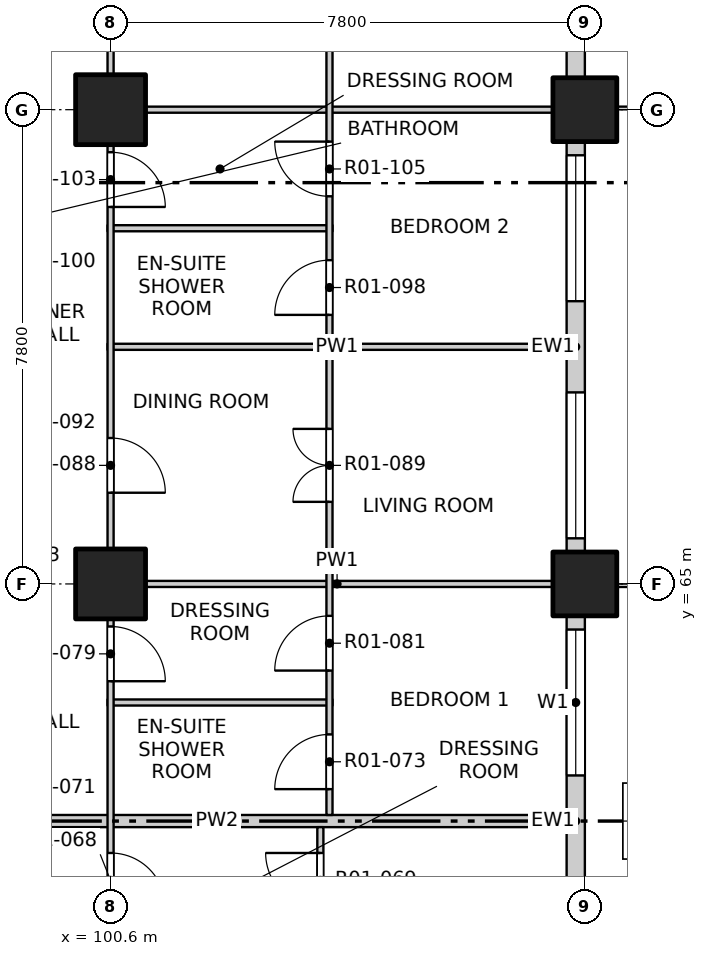
"""IFC4 building model, lengths in metres.
Left out: names, types, materials, properties, quantities, classifications, styles, units other than length and angle.
Written with IfcOpenShell. Run it as: python <this file> out.ifc"""

import sys

from ifc_helpers import new_model, si_unit, direction, frame, frame_2d, origin, origin_2d, place, context, subcontext, project, spatial, rectangle, extrude, element, fill, save


model = new_model("IFC4")
c1 = context("Model", 3, precision=1e-05, world=origin(), true_north=direction((0.0, 1.0)))
c2 = subcontext(c1, "Body", "Model", "MODEL_VIEW")
j1 = project(units=[si_unit("LENGTHUNIT", "METRE"), si_unit("PLANEANGLEUNIT", "RADIAN")], contexts=[c1])
p1 = place(None, origin())
s1 = spatial("IfcSite", under=j1, at=p1, CompositionType="ELEMENT")
p2 = place(p1, origin())
s2 = spatial("IfcBuilding", under=s1, at=p2, CompositionType="ELEMENT")
p3 = place(p2, frame((0.0, 0.0, 19.5)))
s3 = spatial("IfcBuildingStorey", under=s2, at=p3, CompositionType="ELEMENT", Elevation=19.5)
for number, where, z_axis, x_axis in (
    (1, (108.4, 65.0, -0.25), (0.0, 0.0, 1.0), (1.0, 0.0, 0.0)),
    (2, (108.4, 72.8, -0.25), (0.0, 0.0, 1.0), (1.0, 0.0, 0.0)),
):
    element("IfcColumn", number, at=place(p3, frame(where, z_axis=z_axis, x_axis=x_axis)), inside=s3, PredefinedType="COLUMN", context=c2, shape_type="SweptSolid", body=[
        extrude(rectangle(XDim=1.05, YDim=1.05, at=origin_2d()), origin(), (0.0, 0.0, 1.0), 3.4),
    ])
for number, where, z_axis, x_axis in (
    (3, (100.6, 65.0, -0.25), (0.0, 0.0, 1.0), (1.0, 0.0, 0.0)),
    (4, (100.6, 72.8, -0.25), (0.0, 0.0, 1.0), (1.0, 0.0, 0.0)),
):
    element("IfcColumn", number, at=place(p3, frame(where, z_axis=z_axis, x_axis=x_axis)), inside=s3, PredefinedType="COLUMN", context=c2, shape_type="SweptSolid", body=[
        extrude(rectangle(XDim=1.15, YDim=1.15, at=origin_2d()), origin(), (0.0, 0.0, 1.0), 3.4),
    ])
p4 = place(p3, frame((108.25, 57.725, 0.0), z_axis=(0.0, 0.0, 1.0), x_axis=(0.0, 1.0, 0.0)))
e5 = element("IfcWall", 5, at=p4, inside=s3, PredefinedType="SOLIDWALL", context=c2, shape_type="SweptSolid", body=[
    extrude(rectangle(XDim=6.75, YDim=0.3, at=frame_2d((3.375, 0.0))), origin(), (0.0, 0.0, 1.0), 2.7),
])
p5 = place(p4, frame((0.525, 0.0, 0.0)))
e6 = element("IfcOpeningElement", 6, at=p5, cuts=e5, PredefinedType="OPENING", context=c2, shape_type="SweptSolid", body=[
    extrude(rectangle(XDim=1.8, YDim=2.4, at=frame_2d((0.9, 1.2))), frame((0.0, 0.16, 0.0), z_axis=(0.0, -1.0, 0.0), x_axis=(1.0, 0.0, 0.0)), (0.0, 0.0, 1.0), 0.32),
])
p6 = place(p4, frame((4.125, 0.0, 0.9)))
e7 = element("IfcOpeningElement", 7, at=p6, cuts=e5, PredefinedType="OPENING", context=c2, shape_type="SweptSolid", body=[
    extrude(rectangle(XDim=2.4, YDim=1.8, at=frame_2d((1.2, 0.9))), frame((0.0, 0.16, 0.0), z_axis=(0.0, -1.0, 0.0), x_axis=(1.0, 0.0, 0.0)), (0.0, 0.0, 1.0), 0.32),
])
p7 = place(p3, frame((108.25, 65.525, 0.0), z_axis=(0.0, 0.0, 1.0), x_axis=(0.0, 1.0, 0.0)))
e8 = element("IfcWall", 8, at=p7, inside=s3, PredefinedType="SOLIDWALL", context=c2, shape_type="SweptSolid", body=[
    extrude(rectangle(XDim=6.75, YDim=0.3, at=frame_2d((3.375, 0.0))), origin(), (0.0, 0.0, 1.0), 2.7),
])
p8 = place(p7, frame((0.225, 0.0, 0.9)))
e9 = element("IfcOpeningElement", 9, at=p8, cuts=e8, PredefinedType="OPENING", context=c2, shape_type="SweptSolid", body=[
    extrude(rectangle(XDim=2.4, YDim=1.8, at=frame_2d((1.2, 0.9))), frame((0.0, 0.16, 0.0), z_axis=(0.0, -1.0, 0.0), x_axis=(1.0, 0.0, 0.0)), (0.0, 0.0, 1.0), 0.32),
])
p9 = place(p7, frame((4.125, 0.0, 0.9)))
e10 = element("IfcOpeningElement", 10, at=p9, cuts=e8, PredefinedType="OPENING", context=c2, shape_type="SweptSolid", body=[
    extrude(rectangle(XDim=2.4, YDim=1.8, at=frame_2d((1.2, 0.9))), frame((0.0, 0.16, 0.0), z_axis=(0.0, -1.0, 0.0), x_axis=(1.0, 0.0, 0.0)), (0.0, 0.0, 1.0), 0.32),
])
p10 = place(p3, frame((108.25, 73.325, 0.0), z_axis=(0.0, 0.0, 1.0), x_axis=(0.0, 1.0, 0.0)))
e11 = element("IfcWall", 11, at=p10, inside=s3, PredefinedType="SOLIDWALL", context=c2, shape_type="SweptSolid", body=[
    extrude(rectangle(XDim=6.75, YDim=0.3, at=frame_2d((3.375, 0.0))), origin(), (0.0, 0.0, 1.0), 2.7),
])
p11 = place(p10, frame((0.525, 0.0, 0.0)))
e12 = element("IfcOpeningElement", 12, at=p11, cuts=e11, PredefinedType="OPENING", context=c2, shape_type="SweptSolid", body=[
    extrude(rectangle(XDim=1.8, YDim=2.4, at=frame_2d((0.9, 1.2))), frame((0.0, 0.16, 0.0), z_axis=(0.0, -1.0, 0.0), x_axis=(1.0, 0.0, 0.0)), (0.0, 0.0, 1.0), 0.32),
])
p12 = place(p10, frame((4.125, 0.0, 0.9)))
e13 = element("IfcOpeningElement", 13, at=p12, cuts=e11, PredefinedType="OPENING", context=c2, shape_type="SweptSolid", body=[
    extrude(rectangle(XDim=2.4, YDim=1.8, at=frame_2d((1.2, 0.9))), frame((0.0, 0.16, 0.0), z_axis=(0.0, -1.0, 0.0), x_axis=(1.0, 0.0, 0.0)), (0.0, 0.0, 1.0), 0.32),
])
p13 = place(p3, frame((96.6, 61.1, 0.0), z_axis=(0.0, 0.0, 1.0), x_axis=(1.0, 0.0, 0.0)))
e14 = element("IfcWall", 14, at=p13, inside=s3, PredefinedType="PARTITIONING", context=c2, shape_type="SweptSolid", body=[
    extrude(rectangle(XDim=11.5, YDim=0.2, at=frame_2d((5.75, 0.0))), origin(), (0.0, 0.0, 1.0), 3.15),
])
p14 = place(p3, frame((100.55, 63.05, 0.0), z_axis=(0.0, 0.0, 1.0), x_axis=(1.0, 0.0, 0.0)))
e15 = element("IfcWall", 15, at=p14, inside=s3, PredefinedType="PARTITIONING", context=c2, shape_type="SweptSolid", body=[
    extrude(rectangle(XDim=3.7, YDim=0.1, at=frame_2d((1.85, 0.0))), origin(), (0.0, 0.0, 1.0), 3.15),
])
p15 = place(p3, frame((100.55, 65.0, 0.0), z_axis=(0.0, 0.0, 1.0), x_axis=(1.0, 0.0, 0.0)))
e16 = element("IfcWall", 16, at=p15, inside=s3, PredefinedType="PARTITIONING", context=c2, shape_type="SweptSolid", body=[
    extrude(rectangle(XDim=7.55, YDim=0.1, at=frame_2d((3.775, 0.0))), origin(), (0.0, 0.0, 1.0), 2.55),
])
p16 = place(p3, frame((100.55, 68.9, 0.0), z_axis=(0.0, 0.0, 1.0), x_axis=(1.0, 0.0, 0.0)))
e17 = element("IfcWall", 17, at=p16, inside=s3, PredefinedType="PARTITIONING", context=c2, shape_type="SweptSolid", body=[
    extrude(rectangle(XDim=7.55, YDim=0.1, at=frame_2d((3.775, 0.0))), origin(), (0.0, 0.0, 1.0), 3.15),
])
p17 = place(p3, frame((100.55, 70.85, 0.0), z_axis=(0.0, 0.0, 1.0), x_axis=(1.0, 0.0, 0.0)))
e18 = element("IfcWall", 18, at=p17, inside=s3, PredefinedType="PARTITIONING", context=c2, shape_type="SweptSolid", body=[
    extrude(rectangle(XDim=3.7, YDim=0.1, at=frame_2d((1.85, 0.0))), origin(), (0.0, 0.0, 1.0), 3.15),
])
p18 = place(p3, frame((100.55, 72.8, 0.0), z_axis=(0.0, 0.0, 1.0), x_axis=(1.0, 0.0, 0.0)))
e19 = element("IfcWall", 19, at=p18, inside=s3, PredefinedType="PARTITIONING", context=c2, shape_type="SweptSolid", body=[
    extrude(rectangle(XDim=7.55, YDim=0.1, at=frame_2d((3.775, 0.0))), origin(), (0.0, 0.0, 1.0), 2.55),
])
p19 = place(p3, frame((100.6, 49.4, 0.0), z_axis=(0.0, 0.0, 1.0), x_axis=(0.0, 1.0, 0.0)))
e20 = element("IfcWall", 20, at=p19, inside=s3, PredefinedType="PARTITIONING", context=c2, shape_type="SweptSolid", body=[
    extrude(rectangle(XDim=31.2, YDim=0.1, at=frame_2d((15.6, 0.0))), origin(), (0.0, 0.0, 1.0), 3.15),
])
p20 = place(p19, frame((1.5, 0.0, 0.0)))
e21 = element("IfcOpeningElement", 21, at=p20, cuts=e20, PredefinedType="OPENING", context=c2, shape_type="SweptSolid", body=[
    extrude(rectangle(XDim=0.9, YDim=2.1, at=frame_2d((0.45, 1.05))), frame((0.0, 0.06, 0.0), z_axis=(0.0, -1.0, 0.0), x_axis=(1.0, 0.0, 0.0)), (0.0, 0.0, 1.0), 0.12),
])
p21 = place(p19, frame((5.4, 0.0, 0.0)))
e22 = element("IfcOpeningElement", 22, at=p21, cuts=e20, PredefinedType="OPENING", context=c2, shape_type="SweptSolid", body=[
    extrude(rectangle(XDim=0.9, YDim=2.1, at=frame_2d((0.45, 1.05))), frame((0.0, 0.06, 0.0), z_axis=(0.0, -1.0, 0.0), x_axis=(1.0, 0.0, 0.0)), (0.0, 0.0, 1.0), 0.12),
])
p22 = place(p19, frame((10.275, 0.0, 0.0)))
e23 = element("IfcOpeningElement", 23, at=p22, cuts=e20, PredefinedType="OPENING", context=c2, shape_type="SweptSolid", body=[
    extrude(rectangle(XDim=0.9, YDim=2.1, at=frame_2d((0.45, 1.05))), frame((0.0, 0.06, 0.0), z_axis=(0.0, -1.0, 0.0), x_axis=(1.0, 0.0, 0.0)), (0.0, 0.0, 1.0), 0.12),
])
p23 = place(p19, frame((14.0, 0.0, 0.0)))
e24 = element("IfcOpeningElement", 24, at=p23, cuts=e20, PredefinedType="OPENING", context=c2, shape_type="SweptSolid", body=[
    extrude(rectangle(XDim=0.9, YDim=2.1, at=frame_2d((0.45, 1.05))), frame((0.0, 0.06, 0.0), z_axis=(0.0, -1.0, 0.0), x_axis=(1.0, 0.0, 0.0)), (0.0, 0.0, 1.0), 0.12),
])
p24 = place(p19, frame((17.1, 0.0, 0.0)))
e25 = element("IfcOpeningElement", 25, at=p24, cuts=e20, PredefinedType="OPENING", context=c2, shape_type="SweptSolid", body=[
    extrude(rectangle(XDim=0.9, YDim=2.1, at=frame_2d((0.45, 1.05))), frame((0.0, 0.06, 0.0), z_axis=(0.0, -1.0, 0.0), x_axis=(1.0, 0.0, 0.0)), (0.0, 0.0, 1.0), 0.12),
])
p25 = place(p19, frame((21.8, 0.0, 0.0)))
e26 = element("IfcOpeningElement", 26, at=p25, cuts=e20, PredefinedType="OPENING", context=c2, shape_type="SweptSolid", body=[
    extrude(rectangle(XDim=0.9, YDim=2.1, at=frame_2d((0.45, 1.05))), frame((0.0, 0.06, 0.0), z_axis=(0.0, -1.0, 0.0), x_axis=(1.0, 0.0, 0.0)), (0.0, 0.0, 1.0), 0.12),
])
p26 = place(p19, frame((24.9, 0.0, 0.0)))
e27 = element("IfcOpeningElement", 27, at=p26, cuts=e20, PredefinedType="OPENING", context=c2, shape_type="SweptSolid", body=[
    extrude(rectangle(XDim=0.9, YDim=2.1, at=frame_2d((0.45, 1.05))), frame((0.0, 0.06, 0.0), z_axis=(0.0, -1.0, 0.0), x_axis=(1.0, 0.0, 0.0)), (0.0, 0.0, 1.0), 0.12),
])
p27 = place(p19, frame((28.8, 0.0, 0.0)))
e28 = element("IfcOpeningElement", 28, at=p27, cuts=e20, PredefinedType="OPENING", context=c2, shape_type="SweptSolid", body=[
    extrude(rectangle(XDim=0.9, YDim=2.1, at=frame_2d((0.45, 1.05))), frame((0.0, 0.06, 0.0), z_axis=(0.0, -1.0, 0.0), x_axis=(1.0, 0.0, 0.0)), (0.0, 0.0, 1.0), 0.12),
])
p28 = place(p3, frame((104.05, 41.9, 0.0), z_axis=(0.0, 0.0, 1.0), x_axis=(0.0, 1.0, 0.0)))
e29 = element("IfcWall", 29, at=p28, inside=s3, PredefinedType="PARTITIONING", context=c2, shape_type="SweptSolid", body=[
    extrude(rectangle(XDim=19.1, YDim=0.1, at=frame_2d((9.55, 0.0))), origin(), (0.0, 0.0, 1.0), 3.15),
])
p29 = place(p28, frame((1.05, 0.0, 0.0)))
e30 = element("IfcOpeningElement", 30, at=p29, cuts=e29, PredefinedType="OPENING", context=c2, shape_type="SweptSolid", body=[
    extrude(rectangle(XDim=1.2, YDim=2.1, at=frame_2d((0.6, 1.05))), frame((0.0, 0.06, 0.0), z_axis=(0.0, -1.0, 0.0), x_axis=(1.0, 0.0, 0.0)), (0.0, 0.0, 1.0), 0.12),
])
p30 = place(p28, frame((4.125, 0.0, 0.0)))
e31 = element("IfcOpeningElement", 31, at=p30, cuts=e29, PredefinedType="OPENING", context=c2, shape_type="SweptSolid", body=[
    extrude(rectangle(XDim=0.9, YDim=2.1, at=frame_2d((0.45, 1.05))), frame((0.0, 0.06, 0.0), z_axis=(0.0, -1.0, 0.0), x_axis=(1.0, 0.0, 0.0)), (0.0, 0.0, 1.0), 0.12),
])
p31 = place(p28, frame((6.075, 0.0, 0.0)))
e32 = element("IfcOpeningElement", 32, at=p31, cuts=e29, PredefinedType="OPENING", context=c2, shape_type="SweptSolid", body=[
    extrude(rectangle(XDim=0.9, YDim=2.1, at=frame_2d((0.45, 1.05))), frame((0.0, 0.06, 0.0), z_axis=(0.0, -1.0, 0.0), x_axis=(1.0, 0.0, 0.0)), (0.0, 0.0, 1.0), 0.12),
])
p32 = place(p28, frame((8.85, 0.0, 0.0)))
e33 = element("IfcOpeningElement", 33, at=p32, cuts=e29, PredefinedType="OPENING", context=c2, shape_type="SweptSolid", body=[
    extrude(rectangle(XDim=1.2, YDim=2.1, at=frame_2d((0.6, 1.05))), frame((0.0, 0.06, 0.0), z_axis=(0.0, -1.0, 0.0), x_axis=(1.0, 0.0, 0.0)), (0.0, 0.0, 1.0), 0.12),
])
p33 = place(p28, frame((12.75, 0.0, 0.0)))
e34 = element("IfcOpeningElement", 34, at=p33, cuts=e29, PredefinedType="OPENING", context=c2, shape_type="SweptSolid", body=[
    extrude(rectangle(XDim=1.2, YDim=2.1, at=frame_2d((0.6, 1.05))), frame((0.0, 0.06, 0.0), z_axis=(0.0, -1.0, 0.0), x_axis=(1.0, 0.0, 0.0)), (0.0, 0.0, 1.0), 0.12),
])
p34 = place(p28, frame((15.825, 0.0, 0.0)))
e35 = element("IfcOpeningElement", 35, at=p34, cuts=e29, PredefinedType="OPENING", context=c2, shape_type="SweptSolid", body=[
    extrude(rectangle(XDim=0.9, YDim=2.1, at=frame_2d((0.45, 1.05))), frame((0.0, 0.06, 0.0), z_axis=(0.0, -1.0, 0.0), x_axis=(1.0, 0.0, 0.0)), (0.0, 0.0, 1.0), 0.12),
])
p35 = place(p28, frame((17.775, 0.0, 0.0)))
e36 = element("IfcOpeningElement", 36, at=p35, cuts=e29, PredefinedType="OPENING", context=c2, shape_type="SweptSolid", body=[
    extrude(rectangle(XDim=0.9, YDim=2.1, at=frame_2d((0.45, 1.05))), frame((0.0, 0.06, 0.0), z_axis=(0.0, -1.0, 0.0), x_axis=(1.0, 0.0, 0.0)), (0.0, 0.0, 1.0), 0.12),
])
p36 = place(p3, frame((104.2, 61.2, 0.0), z_axis=(0.0, 0.0, 1.0), x_axis=(0.0, 1.0, 0.0)))
e37 = element("IfcWall", 37, at=p36, inside=s3, PredefinedType="PARTITIONING", context=c2, shape_type="SweptSolid", body=[
    extrude(rectangle(XDim=15.4, YDim=0.1, at=frame_2d((7.7, 0.0))), origin(), (0.0, 0.0, 1.0), 3.15),
])
p37 = place(p36, frame((0.425, 0.0, 0.0)))
e38 = element("IfcOpeningElement", 38, at=p37, cuts=e37, PredefinedType="OPENING", context=c2, shape_type="SweptSolid", body=[
    extrude(rectangle(XDim=0.9, YDim=2.1, at=frame_2d((0.45, 1.05))), frame((0.0, 0.06, 0.0), z_axis=(0.0, -1.0, 0.0), x_axis=(1.0, 0.0, 0.0)), (0.0, 0.0, 1.0), 0.12),
])
p38 = place(p36, frame((2.375, 0.0, 0.0)))
e39 = element("IfcOpeningElement", 39, at=p38, cuts=e37, PredefinedType="OPENING", context=c2, shape_type="SweptSolid", body=[
    extrude(rectangle(XDim=0.9, YDim=2.1, at=frame_2d((0.45, 1.05))), frame((0.0, 0.06, 0.0), z_axis=(0.0, -1.0, 0.0), x_axis=(1.0, 0.0, 0.0)), (0.0, 0.0, 1.0), 0.12),
])
p39 = place(p36, frame((5.15, 0.0, 0.0)))
e40 = element("IfcOpeningElement", 40, at=p39, cuts=e37, PredefinedType="OPENING", context=c2, shape_type="SweptSolid", body=[
    extrude(rectangle(XDim=1.2, YDim=2.1, at=frame_2d((0.6, 1.05))), frame((0.0, 0.06, 0.0), z_axis=(0.0, -1.0, 0.0), x_axis=(1.0, 0.0, 0.0)), (0.0, 0.0, 1.0), 0.12),
])
p40 = place(p36, frame((8.225, 0.0, 0.0)))
e41 = element("IfcOpeningElement", 41, at=p40, cuts=e37, PredefinedType="OPENING", context=c2, shape_type="SweptSolid", body=[
    extrude(rectangle(XDim=0.9, YDim=2.1, at=frame_2d((0.45, 1.05))), frame((0.0, 0.06, 0.0), z_axis=(0.0, -1.0, 0.0), x_axis=(1.0, 0.0, 0.0)), (0.0, 0.0, 1.0), 0.12),
])
p41 = place(p36, frame((10.175, 0.0, 0.0)))
e42 = element("IfcOpeningElement", 42, at=p41, cuts=e37, PredefinedType="OPENING", context=c2, shape_type="SweptSolid", body=[
    extrude(rectangle(XDim=0.9, YDim=2.1, at=frame_2d((0.45, 1.05))), frame((0.0, 0.06, 0.0), z_axis=(0.0, -1.0, 0.0), x_axis=(1.0, 0.0, 0.0)), (0.0, 0.0, 1.0), 0.12),
])
p42 = place(p36, frame((12.95, 0.0, 0.0)))
e43 = element("IfcOpeningElement", 43, at=p42, cuts=e37, PredefinedType="OPENING", context=c2, shape_type="SweptSolid", body=[
    extrude(rectangle(XDim=1.2, YDim=2.1, at=frame_2d((0.6, 1.05))), frame((0.0, 0.06, 0.0), z_axis=(0.0, -1.0, 0.0), x_axis=(1.0, 0.0, 0.0)), (0.0, 0.0, 1.0), 0.12),
])
p43 = place(p6, origin())
e44 = element("IfcWindow", 44, at=p43, inside=s3, PartitioningType="DOUBLE_PANEL_VERTICAL", PredefinedType="WINDOW", context=c2, shape_type="SweptSolid", body=[
    extrude(rectangle(XDim=2.4, YDim=1.8, at=frame_2d((1.2, 0.9))), frame((0.0, 0.03, 0.0), z_axis=(0.0, -1.0, 0.0), x_axis=(1.0, 0.0, 0.0)), (0.0, 0.0, 1.0), 0.06),
])
fill(e7, e44)
p44 = place(p8, origin())
e45 = element("IfcWindow", 45, at=p44, inside=s3, PartitioningType="DOUBLE_PANEL_VERTICAL", PredefinedType="WINDOW", context=c2, shape_type="SweptSolid", body=[
    extrude(rectangle(XDim=2.4, YDim=1.8, at=frame_2d((1.2, 0.9))), frame((0.0, 0.03, 0.0), z_axis=(0.0, -1.0, 0.0), x_axis=(1.0, 0.0, 0.0)), (0.0, 0.0, 1.0), 0.06),
])
fill(e9, e45)
p45 = place(p9, origin())
e46 = element("IfcWindow", 46, at=p45, inside=s3, PartitioningType="DOUBLE_PANEL_VERTICAL", PredefinedType="WINDOW", context=c2, shape_type="SweptSolid", body=[
    extrude(rectangle(XDim=2.4, YDim=1.8, at=frame_2d((1.2, 0.9))), frame((0.0, 0.03, 0.0), z_axis=(0.0, -1.0, 0.0), x_axis=(1.0, 0.0, 0.0)), (0.0, 0.0, 1.0), 0.06),
])
fill(e10, e46)
p46 = place(p22, origin())
e47 = element("IfcDoor", 47, at=p46, inside=s3, OperationType="SINGLE_SWING_RIGHT", PredefinedType="DOOR", context=c2, shape_type="SweptSolid", body=[
    extrude(rectangle(XDim=0.9, YDim=2.1, at=frame_2d((0.45, 1.05))), frame((0.0, 0.025, 0.0), z_axis=(0.0, -1.0, 0.0), x_axis=(1.0, 0.0, 0.0)), (0.0, 0.0, 1.0), 0.05),
])
fill(e23, e47)
p47 = place(p35, origin())
e48 = element("IfcDoor", 48, at=p47, inside=s3, OperationType="SINGLE_SWING_RIGHT", PredefinedType="DOOR", context=c2, shape_type="SweptSolid", body=[
    extrude(rectangle(XDim=0.9, YDim=2.1, at=frame_2d((0.45, 1.05))), frame((0.0, 0.025, 0.0), z_axis=(0.0, -1.0, 0.0), x_axis=(1.0, 0.0, 0.0)), (0.0, 0.0, 1.0), 0.05),
])
fill(e36, e48)
p48 = place(p37, origin())
e49 = element("IfcDoor", 49, at=p48, inside=s3, OperationType="SINGLE_SWING_LEFT", PredefinedType="DOOR", context=c2, shape_type="SweptSolid", body=[
    extrude(rectangle(XDim=0.9, YDim=2.1, at=frame_2d((0.45, 1.05))), frame((0.0, 0.025, 0.0), z_axis=(0.0, -1.0, 0.0), x_axis=(1.0, 0.0, 0.0)), (0.0, 0.0, 1.0), 0.05),
])
fill(e38, e49)
p49 = place(p23, origin())
e50 = element("IfcDoor", 50, at=p49, inside=s3, OperationType="SINGLE_SWING_RIGHT", PredefinedType="DOOR", context=c2, shape_type="SweptSolid", body=[
    extrude(rectangle(XDim=0.9, YDim=2.1, at=frame_2d((0.45, 1.05))), frame((0.0, 0.025, 0.0), z_axis=(0.0, -1.0, 0.0), x_axis=(1.0, 0.0, 0.0)), (0.0, 0.0, 1.0), 0.05),
])
fill(e24, e50)
p50 = place(p38, origin())
e51 = element("IfcDoor", 51, at=p50, inside=s3, OperationType="SINGLE_SWING_LEFT", PredefinedType="DOOR", context=c2, shape_type="SweptSolid", body=[
    extrude(rectangle(XDim=0.9, YDim=2.1, at=frame_2d((0.45, 1.05))), frame((0.0, 0.025, 0.0), z_axis=(0.0, -1.0, 0.0), x_axis=(1.0, 0.0, 0.0)), (0.0, 0.0, 1.0), 0.05),
])
fill(e39, e51)
p51 = place(p24, origin())
e52 = element("IfcDoor", 52, at=p51, inside=s3, OperationType="SINGLE_SWING_RIGHT", PredefinedType="DOOR", context=c2, shape_type="SweptSolid", body=[
    extrude(rectangle(XDim=0.9, YDim=2.1, at=frame_2d((0.45, 1.05))), frame((0.0, 0.025, 0.0), z_axis=(0.0, -1.0, 0.0), x_axis=(1.0, 0.0, 0.0)), (0.0, 0.0, 1.0), 0.05),
])
fill(e25, e52)
p52 = place(p39, origin())
e53 = element("IfcDoor", 53, at=p52, inside=s3, OperationType="DOUBLE_DOOR_SINGLE_SWING", PredefinedType="DOOR", context=c2, shape_type="SweptSolid", body=[
    extrude(rectangle(XDim=1.2, YDim=2.1, at=frame_2d((0.6, 1.05))), frame((0.0, 0.025, 0.0), z_axis=(0.0, -1.0, 0.0), x_axis=(1.0, 0.0, 0.0)), (0.0, 0.0, 1.0), 0.05),
])
fill(e40, e53)
p53 = place(p40, origin())
e54 = element("IfcDoor", 54, at=p53, inside=s3, OperationType="SINGLE_SWING_LEFT", PredefinedType="DOOR", context=c2, shape_type="SweptSolid", body=[
    extrude(rectangle(XDim=0.9, YDim=2.1, at=frame_2d((0.45, 1.05))), frame((0.0, 0.025, 0.0), z_axis=(0.0, -1.0, 0.0), x_axis=(1.0, 0.0, 0.0)), (0.0, 0.0, 1.0), 0.05),
])
fill(e41, e54)
p54 = place(p25, origin())
e55 = element("IfcDoor", 55, at=p54, inside=s3, OperationType="SINGLE_SWING_RIGHT", PredefinedType="DOOR", context=c2, shape_type="SweptSolid", body=[
    extrude(rectangle(XDim=0.9, YDim=2.1, at=frame_2d((0.45, 1.05))), frame((0.0, 0.025, 0.0), z_axis=(0.0, -1.0, 0.0), x_axis=(1.0, 0.0, 0.0)), (0.0, 0.0, 1.0), 0.05),
])
fill(e26, e55)
p55 = place(p41, origin())
e56 = element("IfcDoor", 56, at=p55, inside=s3, OperationType="SINGLE_SWING_RIGHT", PredefinedType="DOOR", context=c2, shape_type="SweptSolid", body=[
    extrude(rectangle(XDim=0.9, YDim=2.1, at=frame_2d((0.45, 1.05))), frame((0.0, 0.025, 0.0), z_axis=(0.0, -1.0, 0.0), x_axis=(1.0, 0.0, 0.0)), (0.0, 0.0, 1.0), 0.05),
])
fill(e42, e56)
save(model, sys.argv[1])
